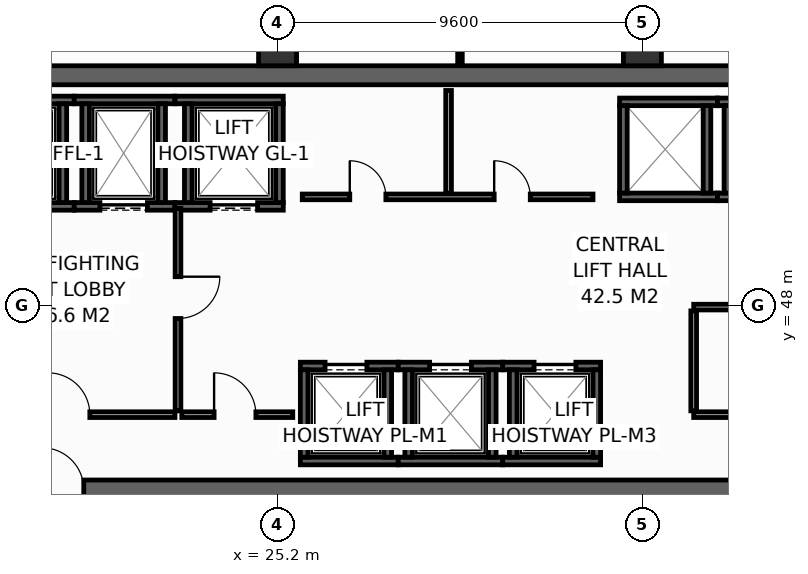
"""IFC4 building model, lengths in metres.
Left out: names, types, materials, properties, quantities, classifications, styles, units other than length and angle.
Written with IfcOpenShell. Run it as: python <this file> out.ifc"""

import sys

from ifc_helpers import new_model, si_unit, direction, frame, frame_2d, origin, origin_2d, place, context, subcontext, project, spatial, rectangle, hollow_rectangle, extrude, element, fill, save


model = new_model("IFC4")
c1 = context("Model", 3, precision=1e-05, world=origin(), true_north=direction((0.0, 1.0)))
c2 = subcontext(c1, "Body", "Model", "MODEL_VIEW")
j1 = project(units=[si_unit("LENGTHUNIT", "METRE"), si_unit("PLANEANGLEUNIT", "RADIAN")], contexts=[c1])
p1 = place(None, origin())
s1 = spatial("IfcSite", under=j1, at=p1, CompositionType="ELEMENT")
p2 = place(p1, origin())
s2 = spatial("IfcBuilding", under=s1, at=p2, CompositionType="ELEMENT")
p3 = place(p2, frame((0.0, 0.0, 133.4)))
s3 = spatial("IfcBuildingStorey", under=s2, at=p3, CompositionType="ELEMENT", Elevation=133.4)
p4 = place(p3, frame((13.6, 43.15, 0.0), z_axis=(0.0, 0.0, 1.0), x_axis=(1.0, 0.0, 0.0)))
e1 = element("IfcWall", 1, at=p4, inside=s3, PredefinedType="SHEAR", context=c2, shape_type="SweptSolid", body=[
    extrude(rectangle(XDim=32.7, YDim=0.5, at=frame_2d((16.35, 0.0))), origin(), (0.0, 0.0, 1.0), 3.55),
])
p5 = place(p4, frame((5.4, 0.0, 0.0)))
e2 = element("IfcOpeningElement", 2, at=p5, cuts=e1, PredefinedType="OPENING", context=c2, shape_type="SweptSolid", body=[
    extrude(rectangle(XDim=1.1, YDim=2.15, at=frame_2d((0.55, 1.075))), frame((0.0, 0.26, 0.0), z_axis=(0.0, -1.0, 0.0), x_axis=(1.0, 0.0, 0.0)), (0.0, 0.0, 1.0), 0.52),
])
p6 = place(p4, frame((25.6, 0.0, 0.0)))
e3 = element("IfcOpeningElement", 3, at=p6, cuts=e1, PredefinedType="OPENING", context=c2, shape_type="SweptSolid", body=[
    extrude(rectangle(XDim=1.1, YDim=2.15, at=frame_2d((0.55, 1.075))), frame((0.0, 0.26, 0.0), z_axis=(0.0, -1.0, 0.0), x_axis=(1.0, 0.0, 0.0)), (0.0, 0.0, 1.0), 0.52),
])
p7 = place(p3, frame((13.6, 54.05, 0.0), z_axis=(0.0, 0.0, 1.0), x_axis=(1.0, 0.0, 0.0)))
e4 = element("IfcWall", 4, at=p7, inside=s3, PredefinedType="SHEAR", context=c2, shape_type="SweptSolid", body=[
    extrude(rectangle(XDim=32.7, YDim=0.5, at=frame_2d((16.35, 0.0))), origin(), (0.0, 0.0, 1.0), 3.55),
])
for number, where, z_axis, x_axis in (
    (5, (25.2, 54.8, 0.0), (0.0, 0.0, 1.0), (1.0, 0.0, 0.0)),
    (6, (34.8, 54.8, 0.0), (0.0, 0.0, 1.0), (1.0, 0.0, 0.0)),
):
    element("IfcColumn", number, at=place(p3, frame(where, z_axis=z_axis, x_axis=x_axis)), inside=s3, PredefinedType="COLUMN", context=c2, shape_type="SweptSolid", body=[
        extrude(hollow_rectangle(XDim=1.0, YDim=1.0, WallThickness=0.045, at=origin_2d()), origin(), (0.0, 0.0, 1.0), 3.8),
    ])
p8 = place(p3, frame((17.33, 50.6, 0.0), z_axis=(0.0, 0.0, 1.0), x_axis=(1.0, 0.0, 0.0)))
e7 = element("IfcWall", 7, at=p8, inside=s3, PredefinedType="SHEAR", context=c2, shape_type="SweptSolid", body=[
    extrude(rectangle(XDim=2.52, YDim=0.2, at=frame_2d((1.26, 0.0))), origin(), (0.0, 0.0, 1.0), 3.55),
])
p9 = place(p8, frame((0.595, 0.0, 0.0)))
e8 = element("IfcOpeningElement", 8, at=p9, cuts=e7, PredefinedType="OPENING", context=c2, shape_type="SweptSolid", body=[
    extrude(rectangle(XDim=1.25, YDim=2.3, at=frame_2d((0.625, 1.15))), frame((0.0, 0.11, 0.0), z_axis=(0.0, -1.0, 0.0), x_axis=(1.0, 0.0, 0.0)), (0.0, 0.0, 1.0), 0.22),
])
p10 = place(p3, frame((17.33, 53.4, 0.0), z_axis=(0.0, 0.0, 1.0), x_axis=(1.0, 0.0, 0.0)))
e9 = element("IfcWall", 9, at=p10, inside=s3, PredefinedType="SHEAR", context=c2, shape_type="SweptSolid", body=[
    extrude(rectangle(XDim=2.52, YDim=0.2, at=frame_2d((1.26, 0.0))), origin(), (0.0, 0.0, 1.0), 3.55),
])
p11 = place(p3, frame((19.55, 50.7, 0.0), z_axis=(0.0, 0.0, 1.0), x_axis=(0.0, 1.0, 0.0)))
e10 = element("IfcWall", 10, at=p11, inside=s3, PredefinedType="SHEAR", context=c2, shape_type="SweptSolid", body=[
    extrude(rectangle(XDim=2.6, YDim=0.2, at=frame_2d((1.3, 0.0))), origin(), (0.0, 0.0, 1.0), 3.55),
])
p12 = place(p3, frame((19.85, 50.6, 0.0), z_axis=(0.0, 0.0, 1.0), x_axis=(1.0, 0.0, 0.0)))
e11 = element("IfcWall", 11, at=p12, inside=s3, PredefinedType="SHEAR", context=c2, shape_type="SweptSolid", body=[
    extrude(rectangle(XDim=2.65, YDim=0.2, at=frame_2d((1.325, 0.0))), origin(), (0.0, 0.0, 1.0), 3.55),
])
p13 = place(p12, frame((0.675, 0.0, 0.0)))
e12 = element("IfcOpeningElement", 12, at=p13, cuts=e11, PredefinedType="OPENING", context=c2, shape_type="SweptSolid", body=[
    extrude(rectangle(XDim=1.25, YDim=2.3, at=frame_2d((0.625, 1.15))), frame((0.0, 0.11, 0.0), z_axis=(0.0, -1.0, 0.0), x_axis=(1.0, 0.0, 0.0)), (0.0, 0.0, 1.0), 0.22),
])
p14 = place(p3, frame((19.85, 53.4, 0.0), z_axis=(0.0, 0.0, 1.0), x_axis=(1.0, 0.0, 0.0)))
e13 = element("IfcWall", 13, at=p14, inside=s3, PredefinedType="SHEAR", context=c2, shape_type="SweptSolid", body=[
    extrude(rectangle(XDim=2.65, YDim=0.2, at=frame_2d((1.325, 0.0))), origin(), (0.0, 0.0, 1.0), 3.55),
])
for number, where, z_axis, x_axis in (
    (14, (20.15, 50.7, 0.0), (0.0, 0.0, 1.0), (0.0, 1.0, 0.0)),
    (15, (22.15, 50.7, 0.0), (0.0, 0.0, 1.0), (0.0, 1.0, 0.0)),
):
    element("IfcWall", number, at=place(p3, frame(where, z_axis=z_axis, x_axis=x_axis)), inside=s3, PredefinedType="SHEAR", context=c2, shape_type="SweptSolid", body=[
        extrude(rectangle(XDim=2.6, YDim=0.2, at=frame_2d((1.3, 0.0))), origin(), (0.0, 0.0, 1.0), 3.55),
    ])
p15 = place(p3, frame((22.5, 50.6, 0.0), z_axis=(0.0, 0.0, 1.0), x_axis=(1.0, 0.0, 0.0)))
e16 = element("IfcWall", 16, at=p15, inside=s3, PredefinedType="SHEAR", context=c2, shape_type="SweptSolid", body=[
    extrude(rectangle(XDim=2.85, YDim=0.2, at=frame_2d((1.425, 0.0))), origin(), (0.0, 0.0, 1.0), 3.55),
])
p16 = place(p15, frame((0.925, 0.0, 0.0)))
e17 = element("IfcOpeningElement", 17, at=p16, cuts=e16, PredefinedType="OPENING", context=c2, shape_type="SweptSolid", body=[
    extrude(rectangle(XDim=1.25, YDim=2.3, at=frame_2d((0.625, 1.15))), frame((0.0, 0.11, 0.0), z_axis=(0.0, -1.0, 0.0), x_axis=(1.0, 0.0, 0.0)), (0.0, 0.0, 1.0), 0.22),
])
p17 = place(p3, frame((22.5, 53.4, 0.0), z_axis=(0.0, 0.0, 1.0), x_axis=(1.0, 0.0, 0.0)))
e18 = element("IfcWall", 18, at=p17, inside=s3, PredefinedType="SHEAR", context=c2, shape_type="SweptSolid", body=[
    extrude(rectangle(XDim=2.85, YDim=0.2, at=frame_2d((1.425, 0.0))), origin(), (0.0, 0.0, 1.0), 3.55),
])
for number, where, z_axis, x_axis in (
    (19, (22.85, 50.7, 0.0), (0.0, 0.0, 1.0), (0.0, 1.0, 0.0)),
    (20, (25.25, 50.7, 0.0), (0.0, 0.0, 1.0), (0.0, 1.0, 0.0)),
):
    element("IfcWall", number, at=place(p3, frame(where, z_axis=z_axis, x_axis=x_axis)), inside=s3, PredefinedType="SHEAR", context=c2, shape_type="SweptSolid", body=[
        extrude(rectangle(XDim=2.6, YDim=0.2, at=frame_2d((1.3, 0.0))), origin(), (0.0, 0.0, 1.0), 3.55),
    ])
p18 = place(p3, frame((25.8, 43.9, 0.0), z_axis=(0.0, 0.0, 1.0), x_axis=(1.0, 0.0, 0.0)))
e21 = element("IfcWall", 21, at=p18, inside=s3, PredefinedType="SHEAR", context=c2, shape_type="SweptSolid", body=[
    extrude(rectangle(XDim=2.575, YDim=0.2, at=frame_2d((1.288, 0.0))), origin(), (0.0, 0.0, 1.0), 3.55),
])
p19 = place(p3, frame((25.8, 46.4, 0.0), z_axis=(0.0, 0.0, 1.0), x_axis=(1.0, 0.0, 0.0)))
e22 = element("IfcWall", 22, at=p19, inside=s3, PredefinedType="SHEAR", context=c2, shape_type="SweptSolid", body=[
    extrude(rectangle(XDim=2.575, YDim=0.2, at=frame_2d((1.288, 0.0))), origin(), (0.0, 0.0, 1.0), 3.55),
])
p20 = place(p19, frame((0.65, 0.0, 0.0)))
e23 = element("IfcOpeningElement", 23, at=p20, cuts=e22, PredefinedType="OPENING", context=c2, shape_type="SweptSolid", body=[
    extrude(rectangle(XDim=1.1, YDim=2.2, at=frame_2d((0.55, 1.1))), frame((0.0, 0.11, 0.0), z_axis=(0.0, -1.0, 0.0), x_axis=(1.0, 0.0, 0.0)), (0.0, 0.0, 1.0), 0.22),
])
for number, where, z_axis, x_axis in (
    (24, (25.9, 44.0, 0.0), (0.0, 0.0, 1.0), (0.0, 1.0, 0.0)),
    (25, (28.1, 44.0, 0.0), (0.0, 0.0, 1.0), (0.0, 1.0, 0.0)),
):
    element("IfcWall", number, at=place(p3, frame(where, z_axis=z_axis, x_axis=x_axis)), inside=s3, PredefinedType="SHEAR", context=c2, shape_type="SweptSolid", body=[
        extrude(rectangle(XDim=2.3, YDim=0.2, at=frame_2d((1.15, 0.0))), origin(), (0.0, 0.0, 1.0), 3.55),
    ])
p21 = place(p3, frame((28.375, 43.9, 0.0), z_axis=(0.0, 0.0, 1.0), x_axis=(1.0, 0.0, 0.0)))
e26 = element("IfcWall", 26, at=p21, inside=s3, PredefinedType="SHEAR", context=c2, shape_type="SweptSolid", body=[
    extrude(rectangle(XDim=2.75, YDim=0.2, at=frame_2d((1.375, 0.0))), origin(), (0.0, 0.0, 1.0), 3.55),
])
p22 = place(p3, frame((28.375, 46.4, 0.0), z_axis=(0.0, 0.0, 1.0), x_axis=(1.0, 0.0, 0.0)))
e27 = element("IfcWall", 27, at=p22, inside=s3, PredefinedType="SHEAR", context=c2, shape_type="SweptSolid", body=[
    extrude(rectangle(XDim=2.75, YDim=0.2, at=frame_2d((1.375, 0.0))), origin(), (0.0, 0.0, 1.0), 3.55),
])
p23 = place(p22, frame((0.825, 0.0, 0.0)))
e28 = element("IfcOpeningElement", 28, at=p23, cuts=e27, PredefinedType="OPENING", context=c2, shape_type="SweptSolid", body=[
    extrude(rectangle(XDim=1.1, YDim=2.2, at=frame_2d((0.55, 1.1))), frame((0.0, 0.11, 0.0), z_axis=(0.0, -1.0, 0.0), x_axis=(1.0, 0.0, 0.0)), (0.0, 0.0, 1.0), 0.22),
])
for number, where, z_axis, x_axis in (
    (29, (28.65, 44.0, 0.0), (0.0, 0.0, 1.0), (0.0, 1.0, 0.0)),
    (30, (30.85, 44.0, 0.0), (0.0, 0.0, 1.0), (0.0, 1.0, 0.0)),
):
    element("IfcWall", number, at=place(p3, frame(where, z_axis=z_axis, x_axis=x_axis)), inside=s3, PredefinedType="SHEAR", context=c2, shape_type="SweptSolid", body=[
        extrude(rectangle(XDim=2.3, YDim=0.2, at=frame_2d((1.15, 0.0))), origin(), (0.0, 0.0, 1.0), 3.55),
    ])
p24 = place(p3, frame((31.125, 43.9, 0.0), z_axis=(0.0, 0.0, 1.0), x_axis=(1.0, 0.0, 0.0)))
e31 = element("IfcWall", 31, at=p24, inside=s3, PredefinedType="SHEAR", context=c2, shape_type="SweptSolid", body=[
    extrude(rectangle(XDim=2.575, YDim=0.2, at=frame_2d((1.288, 0.0))), origin(), (0.0, 0.0, 1.0), 3.55),
])
p25 = place(p3, frame((31.125, 46.4, 0.0), z_axis=(0.0, 0.0, 1.0), x_axis=(1.0, 0.0, 0.0)))
e32 = element("IfcWall", 32, at=p25, inside=s3, PredefinedType="SHEAR", context=c2, shape_type="SweptSolid", body=[
    extrude(rectangle(XDim=2.575, YDim=0.2, at=frame_2d((1.288, 0.0))), origin(), (0.0, 0.0, 1.0), 3.55),
])
p26 = place(p25, frame((0.825, 0.0, 0.0)))
e33 = element("IfcOpeningElement", 33, at=p26, cuts=e32, PredefinedType="OPENING", context=c2, shape_type="SweptSolid", body=[
    extrude(rectangle(XDim=1.1, YDim=2.2, at=frame_2d((0.55, 1.1))), frame((0.0, 0.11, 0.0), z_axis=(0.0, -1.0, 0.0), x_axis=(1.0, 0.0, 0.0)), (0.0, 0.0, 1.0), 0.22),
])
for number, where, z_axis, x_axis in (
    (34, (31.4, 44.0, 0.0), (0.0, 0.0, 1.0), (0.0, 1.0, 0.0)),
    (35, (33.6, 44.0, 0.0), (0.0, 0.0, 1.0), (0.0, 1.0, 0.0)),
):
    element("IfcWall", number, at=place(p3, frame(where, z_axis=z_axis, x_axis=x_axis)), inside=s3, PredefinedType="SHEAR", context=c2, shape_type="SweptSolid", body=[
        extrude(rectangle(XDim=2.3, YDim=0.2, at=frame_2d((1.15, 0.0))), origin(), (0.0, 0.0, 1.0), 3.55),
    ])
for number, where, z_axis, x_axis in (
    (36, (34.2, 50.85, 0.0), (0.0, 0.0, 1.0), (1.0, 0.0, 0.0)),
    (37, (34.2, 53.35, 0.0), (0.0, 0.0, 1.0), (1.0, 0.0, 0.0)),
):
    element("IfcWall", number, at=place(p3, frame(where, z_axis=z_axis, x_axis=x_axis)), inside=s3, PredefinedType="SHEAR", context=c2, shape_type="SweptSolid", body=[
        extrude(rectangle(XDim=2.575, YDim=0.2, at=frame_2d((1.288, 0.0))), origin(), (0.0, 0.0, 1.0), 3.55),
    ])
for number, where, z_axis, x_axis in (
    (38, (34.3, 50.95, 0.0), (0.0, 0.0, 1.0), (0.0, 1.0, 0.0)),
    (39, (36.5, 50.95, 0.0), (0.0, 0.0, 1.0), (0.0, 1.0, 0.0)),
):
    element("IfcWall", number, at=place(p3, frame(where, z_axis=z_axis, x_axis=x_axis)), inside=s3, PredefinedType="SHEAR", context=c2, shape_type="SweptSolid", body=[
        extrude(rectangle(XDim=2.3, YDim=0.2, at=frame_2d((1.15, 0.0))), origin(), (0.0, 0.0, 1.0), 3.55),
    ])
for number, where, z_axis, x_axis in (
    (40, (36.775, 50.85, 0.0), (0.0, 0.0, 1.0), (1.0, 0.0, 0.0)),
    (41, (36.775, 53.35, 0.0), (0.0, 0.0, 1.0), (1.0, 0.0, 0.0)),
):
    element("IfcWall", number, at=place(p3, frame(where, z_axis=z_axis, x_axis=x_axis)), inside=s3, PredefinedType="SHEAR", context=c2, shape_type="SweptSolid", body=[
        extrude(rectangle(XDim=2.75, YDim=0.2, at=frame_2d((1.375, 0.0))), origin(), (0.0, 0.0, 1.0), 3.55),
    ])
p27 = place(p3, frame((37.05, 50.95, 0.0), z_axis=(0.0, 0.0, 1.0), x_axis=(0.0, 1.0, 0.0)))
e42 = element("IfcWall", 42, at=p27, inside=s3, PredefinedType="SHEAR", context=c2, shape_type="SweptSolid", body=[
    extrude(rectangle(XDim=2.3, YDim=0.2, at=frame_2d((1.15, 0.0))), origin(), (0.0, 0.0, 1.0), 3.55),
])
p28 = place(p3, frame((17.36, 45.12, 0.0), z_axis=(0.0, 0.0, 1.0), x_axis=(1.0, 0.0, 0.0)))
e43 = element("IfcWall", 43, at=p28, inside=s3, PredefinedType="PARTITIONING", context=c2, shape_type="SweptSolid", body=[
    extrude(rectangle(XDim=5.14, YDim=0.15, at=frame_2d((2.57, 0.0))), origin(), (0.0, 0.0, 1.0), 3.55),
])
p29 = place(p28, frame((1.8, 0.0, 0.0)))
e44 = element("IfcOpeningElement", 44, at=p29, cuts=e43, PredefinedType="OPENING", context=c2, shape_type="SweptSolid", body=[
    extrude(rectangle(XDim=1.1, YDim=2.15, at=frame_2d((0.55, 1.075))), frame((0.0, 0.085, 0.0), z_axis=(0.0, -1.0, 0.0), x_axis=(1.0, 0.0, 0.0)), (0.0, 0.0, 1.0), 0.17),
])
p30 = place(p3, frame((22.58, 50.55, 0.0), z_axis=(0.0, 0.0, 1.0), x_axis=(0.0, -1.0, 0.0)))
e45 = element("IfcWall", 45, at=p30, inside=s3, PredefinedType="PARTITIONING", context=c2, shape_type="SweptSolid", body=[
    extrude(rectangle(XDim=5.33, YDim=0.15, at=frame_2d((2.665, 0.0))), origin(), (0.0, 0.0, 1.0), 3.55),
])
p31 = place(p30, frame((1.8, 0.0, 0.0)))
e46 = element("IfcOpeningElement", 46, at=p31, cuts=e45, PredefinedType="OPENING", context=c2, shape_type="SweptSolid", body=[
    extrude(rectangle(XDim=1.1, YDim=2.15, at=frame_2d((0.55, 1.075))), frame((0.0, 0.085, 0.0), z_axis=(0.0, -1.0, 0.0), x_axis=(1.0, 0.0, 0.0)), (0.0, 0.0, 1.0), 0.17),
])
p32 = place(p3, frame((22.68, 45.12, 0.0), z_axis=(0.0, 0.0, 1.0), x_axis=(1.0, 0.0, 0.0)))
e47 = element("IfcWall", 47, at=p32, inside=s3, PredefinedType="PARTITIONING", context=c2, shape_type="SweptSolid", body=[
    extrude(rectangle(XDim=2.92, YDim=0.15, at=frame_2d((1.46, 0.0))), origin(), (0.0, 0.0, 1.0), 3.55),
])
p33 = place(p32, frame((0.85, 0.0, 0.0)))
e48 = element("IfcOpeningElement", 48, at=p33, cuts=e47, PredefinedType="OPENING", context=c2, shape_type="SweptSolid", body=[
    extrude(rectangle(XDim=1.1, YDim=2.15, at=frame_2d((0.55, 1.075))), frame((0.0, 0.085, 0.0), z_axis=(0.0, -1.0, 0.0), x_axis=(1.0, 0.0, 0.0)), (0.0, 0.0, 1.0), 0.17),
])
p34 = place(p3, frame((36.15, 45.12, 0.0), z_axis=(0.0, 0.0, 1.0), x_axis=(1.0, 0.0, 0.0)))
e49 = element("IfcWall", 49, at=p34, inside=s3, PredefinedType="PARTITIONING", context=c2, shape_type="SweptSolid", body=[
    extrude(rectangle(XDim=6.35, YDim=0.15, at=frame_2d((3.175, 0.0))), origin(), (0.0, 0.0, 1.0), 3.55),
])
p35 = place(p34, frame((1.05, 0.0, 0.0)))
e50 = element("IfcOpeningElement", 50, at=p35, cuts=e49, PredefinedType="OPENING", context=c2, shape_type="SweptSolid", body=[
    extrude(rectangle(XDim=0.95, YDim=2.15, at=frame_2d((0.475, 1.075))), frame((0.0, 0.085, 0.0), z_axis=(0.0, -1.0, 0.0), x_axis=(1.0, 0.0, 0.0)), (0.0, 0.0, 1.0), 0.17),
])
p36 = place(p34, frame((4.25, 0.0, 0.0)))
e51 = element("IfcOpeningElement", 51, at=p36, cuts=e49, PredefinedType="OPENING", context=c2, shape_type="SweptSolid", body=[
    extrude(rectangle(XDim=0.95, YDim=2.15, at=frame_2d((0.475, 1.075))), frame((0.0, 0.085, 0.0), z_axis=(0.0, -1.0, 0.0), x_axis=(1.0, 0.0, 0.0)), (0.0, 0.0, 1.0), 0.17),
])
p37 = place(p3, frame((36.15, 47.95, 0.0), z_axis=(0.0, 0.0, 1.0), x_axis=(1.0, 0.0, 0.0)))
e52 = element("IfcWall", 52, at=p37, inside=s3, PredefinedType="PARTITIONING", context=c2, shape_type="SweptSolid", body=[
    extrude(rectangle(XDim=6.35, YDim=0.15, at=frame_2d((3.175, 0.0))), origin(), (0.0, 0.0, 1.0), 3.55),
])
p38 = place(p3, frame((36.15, 45.22, 0.0), z_axis=(0.0, 0.0, 1.0), x_axis=(0.0, 1.0, 0.0)))
e53 = element("IfcWall", 53, at=p38, inside=s3, PredefinedType="PARTITIONING", context=c2, shape_type="SweptSolid", body=[
    extrude(rectangle(XDim=2.63, YDim=0.15, at=frame_2d((1.315, 0.0))), origin(), (0.0, 0.0, 1.0), 3.55),
])
p39 = place(p3, frame((25.85, 50.85, 0.0), z_axis=(0.0, 0.0, 1.0), x_axis=(1.0, 0.0, 0.0)))
e54 = element("IfcWall", 54, at=p39, inside=s3, PredefinedType="PARTITIONING", context=c2, shape_type="SweptSolid", body=[
    extrude(rectangle(XDim=7.65, YDim=0.15, at=frame_2d((3.825, 0.0))), origin(), (0.0, 0.0, 1.0), 3.55),
])
p40 = place(p39, frame((1.25, 0.0, 0.0)))
e55 = element("IfcOpeningElement", 55, at=p40, cuts=e54, PredefinedType="OPENING", context=c2, shape_type="SweptSolid", body=[
    extrude(rectangle(XDim=0.95, YDim=2.15, at=frame_2d((0.475, 1.075))), frame((0.0, 0.085, 0.0), z_axis=(0.0, -1.0, 0.0), x_axis=(1.0, 0.0, 0.0)), (0.0, 0.0, 1.0), 0.17),
])
p41 = place(p39, frame((5.05, 0.0, 0.0)))
e56 = element("IfcOpeningElement", 56, at=p41, cuts=e54, PredefinedType="OPENING", context=c2, shape_type="SweptSolid", body=[
    extrude(rectangle(XDim=0.95, YDim=2.15, at=frame_2d((0.475, 1.075))), frame((0.0, 0.085, 0.0), z_axis=(0.0, -1.0, 0.0), x_axis=(1.0, 0.0, 0.0)), (0.0, 0.0, 1.0), 0.17),
])
p42 = place(p3, frame((29.7, 50.95, 0.0), z_axis=(0.0, 0.0, 1.0), x_axis=(0.0, 1.0, 0.0)))
e57 = element("IfcWall", 57, at=p42, inside=s3, PredefinedType="PARTITIONING", context=c2, shape_type="SweptSolid", body=[
    extrude(rectangle(XDim=2.7, YDim=0.15, at=frame_2d((1.35, 0.0))), origin(), (0.0, 0.0, 1.0), 3.55),
])
p43 = place(p3, frame((30.0, 54.32, 0.0), z_axis=(0.0, 0.0, 1.0), x_axis=(0.0, 1.0, 0.0)))
e58 = element("IfcWall", 58, at=p43, inside=s3, PredefinedType="PARTITIONING", context=c2, shape_type="SweptSolid", body=[
    extrude(rectangle(XDim=1.675, YDim=0.12, at=frame_2d((0.837, 0.0))), origin(), (0.0, 0.0, 1.0), 2.935),
])
p44 = place(p13, origin())
e59 = element("IfcDoor", 59, at=p44, inside=s3, OperationType="SLIDING_TO_LEFT", PredefinedType="DOOR", context=c2, shape_type="SweptSolid", body=[
    extrude(rectangle(XDim=1.25, YDim=2.3, at=frame_2d((0.625, 1.15))), frame((0.0, 0.025, 0.0), z_axis=(0.0, -1.0, 0.0), x_axis=(1.0, 0.0, 0.0)), (0.0, 0.0, 1.0), 0.05),
])
fill(e12, e59)
p45 = place(p16, origin())
e60 = element("IfcDoor", 60, at=p45, inside=s3, OperationType="SLIDING_TO_LEFT", PredefinedType="DOOR", context=c2, shape_type="SweptSolid", body=[
    extrude(rectangle(XDim=1.25, YDim=2.3, at=frame_2d((0.625, 1.15))), frame((0.0, 0.025, 0.0), z_axis=(0.0, -1.0, 0.0), x_axis=(1.0, 0.0, 0.0)), (0.0, 0.0, 1.0), 0.05),
])
fill(e17, e60)
p46 = place(p20, origin())
e61 = element("IfcDoor", 61, at=p46, inside=s3, OperationType="SLIDING_TO_LEFT", PredefinedType="DOOR", context=c2, shape_type="SweptSolid", body=[
    extrude(rectangle(XDim=1.1, YDim=2.2, at=frame_2d((0.55, 1.1))), frame((0.0, 0.025, 0.0), z_axis=(0.0, -1.0, 0.0), x_axis=(1.0, 0.0, 0.0)), (0.0, 0.0, 1.0), 0.05),
])
fill(e23, e61)
p47 = place(p23, origin())
e62 = element("IfcDoor", 62, at=p47, inside=s3, OperationType="SLIDING_TO_LEFT", PredefinedType="DOOR", context=c2, shape_type="SweptSolid", body=[
    extrude(rectangle(XDim=1.1, YDim=2.2, at=frame_2d((0.55, 1.1))), frame((0.0, 0.025, 0.0), z_axis=(0.0, -1.0, 0.0), x_axis=(1.0, 0.0, 0.0)), (0.0, 0.0, 1.0), 0.05),
])
fill(e28, e62)
p48 = place(p26, origin())
e63 = element("IfcDoor", 63, at=p48, inside=s3, OperationType="SLIDING_TO_LEFT", PredefinedType="DOOR", context=c2, shape_type="SweptSolid", body=[
    extrude(rectangle(XDim=1.1, YDim=2.2, at=frame_2d((0.55, 1.1))), frame((0.0, 0.025, 0.0), z_axis=(0.0, -1.0, 0.0), x_axis=(1.0, 0.0, 0.0)), (0.0, 0.0, 1.0), 0.05),
])
fill(e33, e63)
p49 = place(p29, origin())
e64 = element("IfcDoor", 64, at=p49, inside=s3, OperationType="SINGLE_SWING_LEFT", PredefinedType="DOOR", context=c2, shape_type="SweptSolid", body=[
    extrude(rectangle(XDim=1.1, YDim=2.15, at=frame_2d((0.55, 1.075))), frame((0.0, 0.025, 0.0), z_axis=(0.0, -1.0, 0.0), x_axis=(1.0, 0.0, 0.0)), (0.0, 0.0, 1.0), 0.05),
])
fill(e44, e64)
p50 = place(p31, origin())
e65 = element("IfcDoor", 65, at=p50, inside=s3, OperationType="SINGLE_SWING_LEFT", PredefinedType="DOOR", context=c2, shape_type="SweptSolid", body=[
    extrude(rectangle(XDim=1.1, YDim=2.15, at=frame_2d((0.55, 1.075))), frame((0.0, 0.025, 0.0), z_axis=(0.0, -1.0, 0.0), x_axis=(1.0, 0.0, 0.0)), (0.0, 0.0, 1.0), 0.05),
])
fill(e46, e65)
p51 = place(p33, origin())
e66 = element("IfcDoor", 66, at=p51, inside=s3, OperationType="SINGLE_SWING_LEFT", PredefinedType="DOOR", context=c2, shape_type="SweptSolid", body=[
    extrude(rectangle(XDim=1.1, YDim=2.15, at=frame_2d((0.55, 1.075))), frame((0.0, 0.025, 0.0), z_axis=(0.0, -1.0, 0.0), x_axis=(1.0, 0.0, 0.0)), (0.0, 0.0, 1.0), 0.05),
])
fill(e48, e66)
p52 = place(p5, origin())
e67 = element("IfcDoor", 67, at=p52, inside=s3, OperationType="SINGLE_SWING_LEFT", PredefinedType="DOOR", context=c2, shape_type="SweptSolid", body=[
    extrude(rectangle(XDim=1.1, YDim=2.15, at=frame_2d((0.55, 1.075))), frame((0.0, 0.025, 0.0), z_axis=(0.0, -1.0, 0.0), x_axis=(1.0, 0.0, 0.0)), (0.0, 0.0, 1.0), 0.05),
])
fill(e2, e67)
p53 = place(p40, origin())
e68 = element("IfcDoor", 68, at=p53, inside=s3, OperationType="SINGLE_SWING_LEFT", PredefinedType="DOOR", context=c2, shape_type="SweptSolid", body=[
    extrude(rectangle(XDim=0.95, YDim=2.15, at=frame_2d((0.475, 1.075))), frame((0.0, 0.025, 0.0), z_axis=(0.0, -1.0, 0.0), x_axis=(1.0, 0.0, 0.0)), (0.0, 0.0, 1.0), 0.05),
])
fill(e55, e68)
p54 = place(p41, origin())
e69 = element("IfcDoor", 69, at=p54, inside=s3, OperationType="SINGLE_SWING_LEFT", PredefinedType="DOOR", context=c2, shape_type="SweptSolid", body=[
    extrude(rectangle(XDim=0.95, YDim=2.15, at=frame_2d((0.475, 1.075))), frame((0.0, 0.025, 0.0), z_axis=(0.0, -1.0, 0.0), x_axis=(1.0, 0.0, 0.0)), (0.0, 0.0, 1.0), 0.05),
])
fill(e56, e69)
save(model, sys.argv[1])
